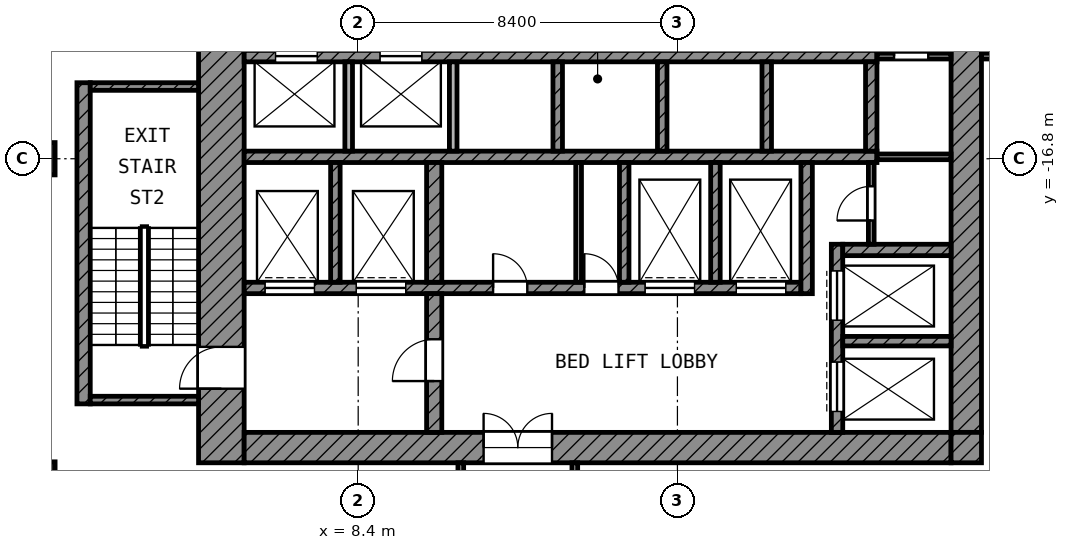
"""IFC4 building model, lengths in metres.
Left out: names, types, materials, properties, quantities, classifications, styles, units other than length and angle.
Written with IfcOpenShell. Run it as: python <this file> out.ifc"""

import sys

from ifc_helpers import new_model, si_unit, direction, frame, frame_2d, origin, origin_2d, place, context, subcontext, project, spatial, rectangle, extrude, element, fill, save


model = new_model("IFC4")
c1 = context("Model", 3, precision=1e-05, world=origin(), true_north=direction((0.0, 1.0)))
c2 = subcontext(c1, "Body", "Model", "MODEL_VIEW")
j1 = project(units=[si_unit("LENGTHUNIT", "METRE"), si_unit("PLANEANGLEUNIT", "RADIAN")], contexts=[c1])
p1 = place(None, origin())
s1 = spatial("IfcSite", under=j1, at=p1, CompositionType="ELEMENT")
p2 = place(p1, origin())
s2 = spatial("IfcBuilding", under=s1, at=p2, CompositionType="ELEMENT")
p3 = place(p2, frame((0.0, 0.0, 243.2)))
s3 = spatial("IfcBuildingStorey", under=s2, at=p3, CompositionType="ELEMENT", Elevation=243.2)
for number, where, z_axis, x_axis in (
    (1, (0.0, -16.8, 0.0), (0.0, 0.0, 1.0), (1.0, 0.0, 0.0)),
    (2, (0.0, -25.2, 0.0), (0.0, 0.0, 1.0), (1.0, 0.0, 0.0)),
):
    element("IfcColumn", number, at=place(p3, frame(where, z_axis=z_axis, x_axis=x_axis)), inside=s3, PredefinedType="COLUMN", context=c2, shape_type="SweptSolid", body=[
        extrude(rectangle(XDim=0.85, YDim=0.85, at=origin_2d()), origin(), (0.0, 0.0, 1.0), 4.2),
    ])
p4 = place(p3, frame((4.8, -24.8, 0.0), z_axis=(0.0, 0.0, 1.0), x_axis=(0.0, 1.0, 0.0)))
e3 = element("IfcWall", 3, at=p4, inside=s3, PredefinedType="SHEAR", context=c2, shape_type="SweptSolid", body=[
    extrude(rectangle(XDim=19.4, YDim=1.2, at=frame_2d((9.7, 0.0))), origin(), (0.0, 0.0, 1.0), 3.6),
])
p5 = place(p4, frame((11.25, 0.0, 0.0)))
e4 = element("IfcOpeningElement", 4, at=p5, cuts=e3, PredefinedType="OPENING", context=c2, shape_type="SweptSolid", body=[
    extrude(rectangle(XDim=1.1, YDim=2.1, at=frame_2d((0.55, 1.05))), frame((0.0, 0.61, 0.0), z_axis=(0.0, -1.0, 0.0), x_axis=(1.0, 0.0, 0.0)), (0.0, 0.0, 1.0), 1.22),
])
p6 = place(p4, frame((1.95, 0.0, 0.0)))
e5 = element("IfcOpeningElement", 5, at=p6, cuts=e3, PredefinedType="OPENING", context=c2, shape_type="SweptSolid", body=[
    extrude(rectangle(XDim=1.1, YDim=2.1, at=frame_2d((0.55, 1.05))), frame((0.0, 0.61, 0.0), z_axis=(0.0, -1.0, 0.0), x_axis=(1.0, 0.0, 0.0)), (0.0, 0.0, 1.0), 1.22),
])
p7 = place(p3, frame((24.4, -24.0, 0.0), z_axis=(0.0, 0.0, 1.0), x_axis=(0.0, 1.0, 0.0)))
e6 = element("IfcWall", 6, at=p7, inside=s3, PredefinedType="SHEAR", context=c2, shape_type="SweptSolid", body=[
    extrude(rectangle(XDim=18.6, YDim=0.8, at=frame_2d((9.3, 0.0))), origin(), (0.0, 0.0, 1.0), 3.6),
])
p8 = place(p7, frame((10.5, 0.0, 0.0)))
e7 = element("IfcOpeningElement", 7, at=p8, cuts=e6, PredefinedType="OPENING", context=c2, shape_type="SweptSolid", body=[
    extrude(rectangle(XDim=1.8, YDim=2.1, at=frame_2d((0.9, 1.05))), frame((0.0, 0.41, 0.0), z_axis=(0.0, -1.0, 0.0), x_axis=(1.0, 0.0, 0.0)), (0.0, 0.0, 1.0), 0.82),
])
p9 = place(p3, frame((5.4, -24.4, 0.0), z_axis=(0.0, 0.0, 1.0), x_axis=(1.0, 0.0, 0.0)))
e8 = element("IfcWall", 8, at=p9, inside=s3, PredefinedType="SHEAR", context=c2, shape_type="SweptSolid", body=[
    extrude(rectangle(XDim=18.6, YDim=0.8, at=frame_2d((9.3, 0.0))), origin(), (0.0, 0.0, 1.0), 3.6),
])
p10 = place(p9, frame((6.3, 0.0, 0.0)))
e9 = element("IfcOpeningElement", 9, at=p10, cuts=e8, PredefinedType="OPENING", context=c2, shape_type="SweptSolid", body=[
    extrude(rectangle(XDim=1.8, YDim=2.1, at=frame_2d((0.9, 1.05))), frame((0.0, 0.41, 0.0), z_axis=(0.0, -1.0, 0.0), x_axis=(1.0, 0.0, 0.0)), (0.0, 0.0, 1.0), 0.82),
])
p11 = place(p3, frame((24.4, -24.8, 0.0), z_axis=(0.0, 0.0, 1.0), x_axis=(0.0, 1.0, 0.0)))
e10 = element("IfcWall", 10, at=p11, inside=s3, PredefinedType="SHEAR", context=c2, shape_type="SweptSolid", body=[
    extrude(rectangle(XDim=0.8, YDim=0.8, at=frame_2d((0.4, 0.0))), origin(), (0.0, 0.0, 1.0), 3.6),
])
p12 = place(p3, frame((5.4, -14.1, 0.0), z_axis=(0.0, 0.0, 1.0), x_axis=(1.0, 0.0, 0.0)))
e11 = element("IfcWall", 11, at=p12, inside=s3, PredefinedType="SHEAR", context=c2, shape_type="SweptSolid", body=[
    extrude(rectangle(XDim=16.65, YDim=0.3, at=frame_2d((8.325, 0.0))), origin(), (0.0, 0.0, 1.0), 3.6),
])
p13 = place(p12, frame((0.825, 0.0, 0.0)))
e12 = element("IfcOpeningElement", 12, at=p13, cuts=e11, PredefinedType="OPENING", context=c2, shape_type="SweptSolid", body=[
    extrude(rectangle(XDim=1.1, YDim=2.1, at=frame_2d((0.55, 1.05))), frame((0.0, 0.16, 0.0), z_axis=(0.0, -1.0, 0.0), x_axis=(1.0, 0.0, 0.0)), (0.0, 0.0, 1.0), 0.32),
])
p14 = place(p12, frame((3.575, 0.0, 0.0)))
e13 = element("IfcOpeningElement", 13, at=p14, cuts=e11, PredefinedType="OPENING", context=c2, shape_type="SweptSolid", body=[
    extrude(rectangle(XDim=1.1, YDim=2.1, at=frame_2d((0.55, 1.05))), frame((0.0, 0.16, 0.0), z_axis=(0.0, -1.0, 0.0), x_axis=(1.0, 0.0, 0.0)), (0.0, 0.0, 1.0), 0.32),
])
p15 = place(p3, frame((5.4, -16.75, 0.0), z_axis=(0.0, 0.0, 1.0), x_axis=(1.0, 0.0, 0.0)))
e14 = element("IfcWall", 14, at=p15, inside=s3, PredefinedType="SHEAR", context=c2, shape_type="SweptSolid", body=[
    extrude(rectangle(XDim=16.65, YDim=0.3, at=frame_2d((8.325, 0.0))), origin(), (0.0, 0.0, 1.0), 3.6),
])
p16 = place(p3, frame((5.4, -20.2, 0.0), z_axis=(0.0, 0.0, 1.0), x_axis=(1.0, 0.0, 0.0)))
e15 = element("IfcWall", 15, at=p16, inside=s3, PredefinedType="SHEAR", context=c2, shape_type="SweptSolid", body=[
    extrude(rectangle(XDim=14.65, YDim=0.3, at=frame_2d((7.325, 0.0))), origin(), (0.0, 0.0, 1.0), 3.6),
])
p17 = place(p16, frame((10.55, 0.0, 0.0)))
e16 = element("IfcOpeningElement", 16, at=p17, cuts=e15, PredefinedType="OPENING", context=c2, shape_type="SweptSolid", body=[
    extrude(rectangle(XDim=1.3, YDim=2.1, at=frame_2d((0.65, 1.05))), frame((0.0, 0.16, 0.0), z_axis=(0.0, -1.0, 0.0), x_axis=(1.0, 0.0, 0.0)), (0.0, 0.0, 1.0), 0.32),
])
p18 = place(p16, frame((12.95, 0.0, 0.0)))
e17 = element("IfcOpeningElement", 17, at=p18, cuts=e15, PredefinedType="OPENING", context=c2, shape_type="SweptSolid", body=[
    extrude(rectangle(XDim=1.3, YDim=2.1, at=frame_2d((0.65, 1.05))), frame((0.0, 0.16, 0.0), z_axis=(0.0, -1.0, 0.0), x_axis=(1.0, 0.0, 0.0)), (0.0, 0.0, 1.0), 0.32),
])
p19 = place(p16, frame((0.55, 0.0, 0.0)))
e18 = element("IfcOpeningElement", 18, at=p19, cuts=e15, PredefinedType="OPENING", context=c2, shape_type="SweptSolid", body=[
    extrude(rectangle(XDim=1.3, YDim=2.1, at=frame_2d((0.65, 1.05))), frame((0.0, 0.16, 0.0), z_axis=(0.0, -1.0, 0.0), x_axis=(1.0, 0.0, 0.0)), (0.0, 0.0, 1.0), 0.32),
])
p20 = place(p16, frame((2.95, 0.0, 0.0)))
e19 = element("IfcOpeningElement", 19, at=p20, cuts=e15, PredefinedType="OPENING", context=c2, shape_type="SweptSolid", body=[
    extrude(rectangle(XDim=1.3, YDim=2.1, at=frame_2d((0.65, 1.05))), frame((0.0, 0.16, 0.0), z_axis=(0.0, -1.0, 0.0), x_axis=(1.0, 0.0, 0.0)), (0.0, 0.0, 1.0), 0.32),
])
p21 = place(p16, frame((6.55, 0.0, 0.0)))
e20 = element("IfcOpeningElement", 20, at=p21, cuts=e15, PredefinedType="OPENING", context=c2, shape_type="SweptSolid", body=[
    extrude(rectangle(XDim=0.9, YDim=2.1, at=frame_2d((0.45, 1.05))), frame((0.0, 0.16, 0.0), z_axis=(0.0, -1.0, 0.0), x_axis=(1.0, 0.0, 0.0)), (0.0, 0.0, 1.0), 0.32),
])
p22 = place(p16, frame((8.95, 0.0, 0.0)))
e21 = element("IfcOpeningElement", 21, at=p22, cuts=e15, PredefinedType="OPENING", context=c2, shape_type="SweptSolid", body=[
    extrude(rectangle(XDim=0.9, YDim=2.1, at=frame_2d((0.45, 1.05))), frame((0.0, 0.16, 0.0), z_axis=(0.0, -1.0, 0.0), x_axis=(1.0, 0.0, 0.0)), (0.0, 0.0, 1.0), 0.32),
])
p23 = place(p3, frame((10.4, -24.0, 0.0), z_axis=(0.0, 0.0, 1.0), x_axis=(0.0, 1.0, 0.0)))
e22 = element("IfcWall", 22, at=p23, inside=s3, PredefinedType="SHEAR", context=c2, shape_type="SweptSolid", body=[
    extrude(rectangle(XDim=3.65, YDim=0.4, at=frame_2d((1.825, 0.0))), origin(), (0.0, 0.0, 1.0), 3.6),
])
p24 = place(p23, frame((1.35, 0.0, 0.0)))
e23 = element("IfcOpeningElement", 23, at=p24, cuts=e22, PredefinedType="OPENING", context=c2, shape_type="SweptSolid", body=[
    extrude(rectangle(XDim=1.1, YDim=2.1, at=frame_2d((0.55, 1.05))), frame((0.0, 0.21, 0.0), z_axis=(0.0, -1.0, 0.0), x_axis=(1.0, 0.0, 0.0)), (0.0, 0.0, 1.0), 0.42),
])
p25 = place(p3, frame((10.4, -20.05, 0.0), z_axis=(0.0, 0.0, 1.0), x_axis=(0.0, 1.0, 0.0)))
e24 = element("IfcWall", 24, at=p25, inside=s3, PredefinedType="SHEAR", context=c2, shape_type="SweptSolid", body=[
    extrude(rectangle(XDim=3.15, YDim=0.4, at=frame_2d((1.575, 0.0))), origin(), (0.0, 0.0, 1.0), 3.6),
])
p26 = place(p3, frame((20.2, -20.35, 0.0), z_axis=(0.0, 0.0, 1.0), x_axis=(0.0, 1.0, 0.0)))
e25 = element("IfcWall", 25, at=p26, inside=s3, PredefinedType="SHEAR", context=c2, shape_type="SweptSolid", body=[
    extrude(rectangle(XDim=3.45, YDim=0.3, at=frame_2d((1.725, 0.0))), origin(), (0.0, 0.0, 1.0), 3.6),
])
p27 = place(p3, frame((21.9, -16.6, 0.0), z_axis=(0.0, 0.0, 1.0), x_axis=(0.0, 1.0, 0.0)))
e26 = element("IfcWall", 26, at=p27, inside=s3, PredefinedType="SHEAR", context=c2, shape_type="SweptSolid", body=[
    extrude(rectangle(XDim=2.35, YDim=0.3, at=frame_2d((1.175, 0.0))), origin(), (0.0, 0.0, 1.0), 3.6),
])
p28 = place(p3, frame((21.15, -19.2, 0.0), z_axis=(0.0, 0.0, 1.0), x_axis=(1.0, 0.0, 0.0)))
e27 = element("IfcWall", 27, at=p28, inside=s3, PredefinedType="SHEAR", context=c2, shape_type="SweptSolid", body=[
    extrude(rectangle(XDim=2.85, YDim=0.3, at=frame_2d((1.425, 0.0))), origin(), (0.0, 0.0, 1.0), 3.6),
])
p29 = place(p3, frame((21.0, -24.0, 0.0), z_axis=(0.0, 0.0, 1.0), x_axis=(0.0, 1.0, 0.0)))
e28 = element("IfcWall", 28, at=p29, inside=s3, PredefinedType="SHEAR", context=c2, shape_type="SweptSolid", body=[
    extrude(rectangle(XDim=4.95, YDim=0.3, at=frame_2d((2.475, 0.0))), origin(), (0.0, 0.0, 1.0), 3.6),
])
p30 = place(p29, frame((2.95, 0.0, 0.0)))
e29 = element("IfcOpeningElement", 29, at=p30, cuts=e28, PredefinedType="OPENING", context=c2, shape_type="SweptSolid", body=[
    extrude(rectangle(XDim=1.3, YDim=2.1, at=frame_2d((0.65, 1.05))), frame((0.0, 0.16, 0.0), z_axis=(0.0, -1.0, 0.0), x_axis=(1.0, 0.0, 0.0)), (0.0, 0.0, 1.0), 0.32),
])
p31 = place(p29, frame((0.55, 0.0, 0.0)))
e30 = element("IfcOpeningElement", 30, at=p31, cuts=e28, PredefinedType="OPENING", context=c2, shape_type="SweptSolid", body=[
    extrude(rectangle(XDim=1.3, YDim=2.1, at=frame_2d((0.65, 1.05))), frame((0.0, 0.16, 0.0), z_axis=(0.0, -1.0, 0.0), x_axis=(1.0, 0.0, 0.0)), (0.0, 0.0, 1.0), 0.32),
])
p32 = place(p3, frame((21.15, -21.6, 0.0), z_axis=(0.0, 0.0, 1.0), x_axis=(1.0, 0.0, 0.0)))
e31 = element("IfcWall", 31, at=p32, inside=s3, PredefinedType="SHEAR", context=c2, shape_type="SweptSolid", body=[
    extrude(rectangle(XDim=2.85, YDim=0.25, at=frame_2d((1.425, 0.0))), origin(), (0.0, 0.0, 1.0), 3.6),
])
for number, where, z_axis, x_axis in (
    (32, (7.8, -20.05, 0.0), (0.0, 0.0, 1.0), (0.0, 1.0, 0.0)),
    (33, (15.4, -20.05, 0.0), (0.0, 0.0, 1.0), (0.0, 1.0, 0.0)),
    (34, (17.8, -20.05, 0.0), (0.0, 0.0, 1.0), (0.0, 1.0, 0.0)),
):
    element("IfcWall", number, at=place(p3, frame(where, z_axis=z_axis, x_axis=x_axis)), inside=s3, PredefinedType="SHEAR", context=c2, shape_type="SweptSolid", body=[
        extrude(rectangle(XDim=3.15, YDim=0.25, at=frame_2d((1.575, 0.0))), origin(), (0.0, 0.0, 1.0), 3.6),
    ])
for number, where, z_axis, x_axis in (
    (35, (8.15, -16.6, 0.0), (0.0, 0.0, 1.0), (0.0, 1.0, 0.0)),
    (36, (10.9, -16.6, 0.0), (0.0, 0.0, 1.0), (0.0, 1.0, 0.0)),
):
    element("IfcWall", number, at=place(p3, frame(where, z_axis=z_axis, x_axis=x_axis)), inside=s3, PredefinedType="PARTITIONING", context=c2, shape_type="SweptSolid", body=[
        extrude(rectangle(XDim=2.35, YDim=0.2, at=frame_2d((1.175, 0.0))), origin(), (0.0, 0.0, 1.0), 3.6),
    ])
for number, where, z_axis, x_axis in (
    (37, (13.65, -16.6, 0.0), (0.0, 0.0, 1.0), (0.0, 1.0, 0.0)),
    (38, (16.4, -16.6, 0.0), (0.0, 0.0, 1.0), (0.0, 1.0, 0.0)),
    (39, (19.15, -16.6, 0.0), (0.0, 0.0, 1.0), (0.0, 1.0, 0.0)),
):
    element("IfcWall", number, at=place(p3, frame(where, z_axis=z_axis, x_axis=x_axis)), inside=s3, PredefinedType="SHEAR", context=c2, shape_type="SweptSolid", body=[
        extrude(rectangle(XDim=2.35, YDim=0.25, at=frame_2d((1.175, 0.0))), origin(), (0.0, 0.0, 1.0), 3.6),
    ])
p33 = place(p3, frame((21.9, -19.05, 0.0), z_axis=(0.0, 0.0, 1.0), x_axis=(0.0, 1.0, 0.0)))
e40 = element("IfcWall", 40, at=p33, inside=s3, PredefinedType="PARTITIONING", context=c2, shape_type="SweptSolid", body=[
    extrude(rectangle(XDim=2.15, YDim=0.15, at=frame_2d((1.075, 0.0))), origin(), (0.0, 0.0, 1.0), 3.6),
])
p34 = place(p33, frame((0.625, 0.0, 0.0)))
e41 = element("IfcOpeningElement", 41, at=p34, cuts=e40, PredefinedType="OPENING", context=c2, shape_type="SweptSolid", body=[
    extrude(rectangle(XDim=0.9, YDim=2.1, at=frame_2d((0.45, 1.05))), frame((0.0, 0.085, 0.0), z_axis=(0.0, -1.0, 0.0), x_axis=(1.0, 0.0, 0.0)), (0.0, 0.0, 1.0), 0.17),
])
p35 = place(p3, frame((22.05, -16.75, 0.0), z_axis=(0.0, 0.0, 1.0), x_axis=(1.0, 0.0, 0.0)))
e42 = element("IfcWall", 42, at=p35, inside=s3, PredefinedType="PARTITIONING", context=c2, shape_type="SweptSolid", body=[
    extrude(rectangle(XDim=1.95, YDim=0.15, at=frame_2d((0.975, 0.0))), origin(), (0.0, 0.0, 1.0), 3.6),
])
p36 = place(p3, frame((22.05, -14.1, 0.0), z_axis=(0.0, 0.0, 1.0), x_axis=(1.0, 0.0, 0.0)))
e43 = element("IfcWall", 43, at=p36, inside=s3, PredefinedType="PARTITIONING", context=c2, shape_type="SweptSolid", body=[
    extrude(rectangle(XDim=1.95, YDim=0.15, at=frame_2d((0.975, 0.0))), origin(), (0.0, 0.0, 1.0), 3.6),
])
p37 = place(p36, frame((0.45, 0.0, 0.0)))
e44 = element("IfcOpeningElement", 44, at=p37, cuts=e43, PredefinedType="OPENING", context=c2, shape_type="SweptSolid", body=[
    extrude(rectangle(XDim=0.9, YDim=2.1, at=frame_2d((0.45, 1.05))), frame((0.0, 0.085, 0.0), z_axis=(0.0, -1.0, 0.0), x_axis=(1.0, 0.0, 0.0)), (0.0, 0.0, 1.0), 0.17),
])
p38 = place(p3, frame((14.2, -20.05, 0.0), z_axis=(0.0, 0.0, 1.0), x_axis=(0.0, 1.0, 0.0)))
e45 = element("IfcWall", 45, at=p38, inside=s3, PredefinedType="PARTITIONING", context=c2, shape_type="SweptSolid", body=[
    extrude(rectangle(XDim=3.15, YDim=0.15, at=frame_2d((1.575, 0.0))), origin(), (0.0, 0.0, 1.0), 3.6),
])
p39 = place(p3, frame((1.175, -23.25, 0.0), z_axis=(0.0, 0.0, 1.0), x_axis=(0.0, 1.0, 0.0)))
e46 = element("IfcWall", 46, at=p39, inside=s3, PredefinedType="SHEAR", context=c2, shape_type="SweptSolid", body=[
    extrude(rectangle(XDim=8.45, YDim=0.35, at=frame_2d((4.225, 0.0))), origin(), (0.0, 0.0, 1.0), 3.6),
])
for number, where, z_axis, x_axis in (
    (47, (1.35, -14.9, 0.0), (0.0, 0.0, 1.0), (1.0, 0.0, 0.0)),
    (48, (1.35, -23.15, 0.0), (0.0, 0.0, 1.0), (1.0, 0.0, 0.0)),
):
    element("IfcWall", number, at=place(p3, frame(where, z_axis=z_axis, x_axis=x_axis)), inside=s3, PredefinedType="SHEAR", context=c2, shape_type="SweptSolid", body=[
        extrude(rectangle(XDim=2.85, YDim=0.2, at=frame_2d((1.425, 0.0))), origin(), (0.0, 0.0, 1.0), 3.6),
    ])
p40 = place(p3, frame((24.8, -14.1, 0.0), z_axis=(0.0, 0.0, 1.0), x_axis=(1.0, 0.0, 0.0)))
e49 = element("IfcWall", 49, at=p40, inside=s3, PredefinedType="PARTITIONING", context=c2, shape_type="SweptSolid", body=[
    extrude(rectangle(XDim=4.525, YDim=0.15, at=frame_2d((2.262, 0.0))), origin(), (0.0, 0.0, 1.0), 3.6),
])
p41 = place(p40, frame((1.75, 0.0, 0.0)))
e50 = element("IfcOpeningElement", 50, at=p41, cuts=e49, PredefinedType="OPENING", context=c2, shape_type="SweptSolid", body=[
    extrude(rectangle(XDim=1.5, YDim=2.1, at=frame_2d((0.75, 1.05))), frame((0.0, 0.085, 0.0), z_axis=(0.0, -1.0, 0.0), x_axis=(1.0, 0.0, 0.0)), (0.0, 0.0, 1.0), 0.17),
])
p42 = place(p3, frame((11.1, -29.399, 0.0), z_axis=(0.0, 0.0, 1.0), x_axis=(0.0, 1.0, 0.0)))
e51 = element("IfcWall", 51, at=p42, inside=s3, PredefinedType="PARTITIONING", context=c2, shape_type="SweptSolid", body=[
    extrude(rectangle(XDim=4.599, YDim=0.15, at=frame_2d((2.299, 0.0))), origin(), (0.0, 0.0, 1.0), 3.6),
])
p43 = place(p42, frame((1.749, 0.0, 0.0)))
e52 = element("IfcOpeningElement", 52, at=p43, cuts=e51, PredefinedType="OPENING", context=c2, shape_type="SweptSolid", body=[
    extrude(rectangle(XDim=1.0, YDim=2.1, at=frame_2d((0.5, 1.05))), frame((0.0, 0.085, 0.0), z_axis=(0.0, -1.0, 0.0), x_axis=(1.0, 0.0, 0.0)), (0.0, 0.0, 1.0), 0.17),
])
p44 = place(p3, frame((14.1, -29.4, 0.0), z_axis=(0.0, 0.0, 1.0), x_axis=(0.0, 1.0, 0.0)))
e53 = element("IfcWall", 53, at=p44, inside=s3, PredefinedType="PARTITIONING", context=c2, shape_type="SweptSolid", body=[
    extrude(rectangle(XDim=4.6, YDim=0.15, at=frame_2d((2.3, 0.0))), origin(), (0.0, 0.0, 1.0), 3.6),
])
p45 = place(p13, origin())
e54 = element("IfcDoor", 54, at=p45, inside=s3, OperationType="DOUBLE_DOOR_SLIDING", PredefinedType="DOOR", context=c2, shape_type="SweptSolid", body=[
    extrude(rectangle(XDim=1.1, YDim=2.1, at=frame_2d((0.55, 1.05))), frame((0.0, 0.025, 0.0), z_axis=(0.0, -1.0, 0.0), x_axis=(1.0, 0.0, 0.0)), (0.0, 0.0, 1.0), 0.05),
])
fill(e12, e54)
p46 = place(p14, origin())
e55 = element("IfcDoor", 55, at=p46, inside=s3, OperationType="DOUBLE_DOOR_SLIDING", PredefinedType="DOOR", context=c2, shape_type="SweptSolid", body=[
    extrude(rectangle(XDim=1.1, YDim=2.1, at=frame_2d((0.55, 1.05))), frame((0.0, 0.025, 0.0), z_axis=(0.0, -1.0, 0.0), x_axis=(1.0, 0.0, 0.0)), (0.0, 0.0, 1.0), 0.05),
])
fill(e13, e55)
p47 = place(p30, origin())
e56 = element("IfcDoor", 56, at=p47, inside=s3, OperationType="DOUBLE_DOOR_SLIDING", PredefinedType="DOOR", context=c2, shape_type="SweptSolid", body=[
    extrude(rectangle(XDim=1.3, YDim=2.1, at=frame_2d((0.65, 1.05))), frame((0.0, 0.025, 0.0), z_axis=(0.0, -1.0, 0.0), x_axis=(1.0, 0.0, 0.0)), (0.0, 0.0, 1.0), 0.05),
])
fill(e29, e56)
p48 = place(p31, origin())
e57 = element("IfcDoor", 57, at=p48, inside=s3, OperationType="DOUBLE_DOOR_SLIDING", PredefinedType="DOOR", context=c2, shape_type="SweptSolid", body=[
    extrude(rectangle(XDim=1.3, YDim=2.1, at=frame_2d((0.65, 1.05))), frame((0.0, 0.025, 0.0), z_axis=(0.0, -1.0, 0.0), x_axis=(1.0, 0.0, 0.0)), (0.0, 0.0, 1.0), 0.05),
])
fill(e30, e57)
p49 = place(p17, origin())
e58 = element("IfcDoor", 58, at=p49, inside=s3, OperationType="DOUBLE_DOOR_SLIDING", PredefinedType="DOOR", context=c2, shape_type="SweptSolid", body=[
    extrude(rectangle(XDim=1.3, YDim=2.1, at=frame_2d((0.65, 1.05))), frame((0.0, 0.025, 0.0), z_axis=(0.0, -1.0, 0.0), x_axis=(1.0, 0.0, 0.0)), (0.0, 0.0, 1.0), 0.05),
])
fill(e16, e58)
p50 = place(p18, origin())
e59 = element("IfcDoor", 59, at=p50, inside=s3, OperationType="DOUBLE_DOOR_SLIDING", PredefinedType="DOOR", context=c2, shape_type="SweptSolid", body=[
    extrude(rectangle(XDim=1.3, YDim=2.1, at=frame_2d((0.65, 1.05))), frame((0.0, 0.025, 0.0), z_axis=(0.0, -1.0, 0.0), x_axis=(1.0, 0.0, 0.0)), (0.0, 0.0, 1.0), 0.05),
])
fill(e17, e59)
p51 = place(p19, origin())
e60 = element("IfcDoor", 60, at=p51, inside=s3, OperationType="DOUBLE_DOOR_SLIDING", PredefinedType="DOOR", context=c2, shape_type="SweptSolid", body=[
    extrude(rectangle(XDim=1.3, YDim=2.1, at=frame_2d((0.65, 1.05))), frame((0.0, 0.025, 0.0), z_axis=(0.0, -1.0, 0.0), x_axis=(1.0, 0.0, 0.0)), (0.0, 0.0, 1.0), 0.05),
])
fill(e18, e60)
p52 = place(p20, origin())
e61 = element("IfcDoor", 61, at=p52, inside=s3, OperationType="DOUBLE_DOOR_SLIDING", PredefinedType="DOOR", context=c2, shape_type="SweptSolid", body=[
    extrude(rectangle(XDim=1.3, YDim=2.1, at=frame_2d((0.65, 1.05))), frame((0.0, 0.025, 0.0), z_axis=(0.0, -1.0, 0.0), x_axis=(1.0, 0.0, 0.0)), (0.0, 0.0, 1.0), 0.05),
])
fill(e19, e61)
p53 = place(p6, origin())
e62 = element("IfcDoor", 62, at=p53, inside=s3, OperationType="SINGLE_SWING_LEFT", PredefinedType="DOOR", context=c2, shape_type="SweptSolid", body=[
    extrude(rectangle(XDim=1.1, YDim=2.1, at=frame_2d((0.55, 1.05))), frame((0.0, 0.025, 0.0), z_axis=(0.0, -1.0, 0.0), x_axis=(1.0, 0.0, 0.0)), (0.0, 0.0, 1.0), 0.05),
])
fill(e5, e62)
p54 = place(p24, origin())
e63 = element("IfcDoor", 63, at=p54, inside=s3, OperationType="SINGLE_SWING_LEFT", PredefinedType="DOOR", context=c2, shape_type="SweptSolid", body=[
    extrude(rectangle(XDim=1.1, YDim=2.1, at=frame_2d((0.55, 1.05))), frame((0.0, 0.025, 0.0), z_axis=(0.0, -1.0, 0.0), x_axis=(1.0, 0.0, 0.0)), (0.0, 0.0, 1.0), 0.05),
])
fill(e23, e63)
p55 = place(p10, origin())
e64 = element("IfcDoor", 64, at=p55, inside=s3, OperationType="DOUBLE_DOOR_SINGLE_SWING", PredefinedType="DOOR", context=c2, shape_type="SweptSolid", body=[
    extrude(rectangle(XDim=1.8, YDim=2.1, at=frame_2d((0.9, 1.05))), frame((0.0, 0.025, 0.0), z_axis=(0.0, -1.0, 0.0), x_axis=(1.0, 0.0, 0.0)), (0.0, 0.0, 1.0), 0.05),
])
fill(e9, e64)
p56 = place(p37, origin())
e65 = element("IfcDoor", 65, at=p56, inside=s3, OperationType="SINGLE_SWING_LEFT", PredefinedType="DOOR", context=c2, shape_type="SweptSolid", body=[
    extrude(rectangle(XDim=0.9, YDim=2.1, at=frame_2d((0.45, 1.05))), frame((0.0, 0.025, 0.0), z_axis=(0.0, -1.0, 0.0), x_axis=(1.0, 0.0, 0.0)), (0.0, 0.0, 1.0), 0.05),
])
fill(e44, e65)
p57 = place(p34, origin())
e66 = element("IfcDoor", 66, at=p57, inside=s3, OperationType="SINGLE_SWING_LEFT", PredefinedType="DOOR", context=c2, shape_type="SweptSolid", body=[
    extrude(rectangle(XDim=0.9, YDim=2.1, at=frame_2d((0.45, 1.05))), frame((0.0, 0.025, 0.0), z_axis=(0.0, -1.0, 0.0), x_axis=(1.0, 0.0, 0.0)), (0.0, 0.0, 1.0), 0.05),
])
fill(e41, e66)
p58 = place(p21, origin())
e67 = element("IfcDoor", 67, at=p58, inside=s3, OperationType="SINGLE_SWING_LEFT", PredefinedType="DOOR", context=c2, shape_type="SweptSolid", body=[
    extrude(rectangle(XDim=0.9, YDim=2.1, at=frame_2d((0.45, 1.05))), frame((0.0, 0.025, 0.0), z_axis=(0.0, -1.0, 0.0), x_axis=(1.0, 0.0, 0.0)), (0.0, 0.0, 1.0), 0.05),
])
fill(e20, e67)
p59 = place(p22, origin())
e68 = element("IfcDoor", 68, at=p59, inside=s3, OperationType="SINGLE_SWING_LEFT", PredefinedType="DOOR", context=c2, shape_type="SweptSolid", body=[
    extrude(rectangle(XDim=0.9, YDim=2.1, at=frame_2d((0.45, 1.05))), frame((0.0, 0.025, 0.0), z_axis=(0.0, -1.0, 0.0), x_axis=(1.0, 0.0, 0.0)), (0.0, 0.0, 1.0), 0.05),
])
fill(e21, e68)
save(model, sys.argv[1])
